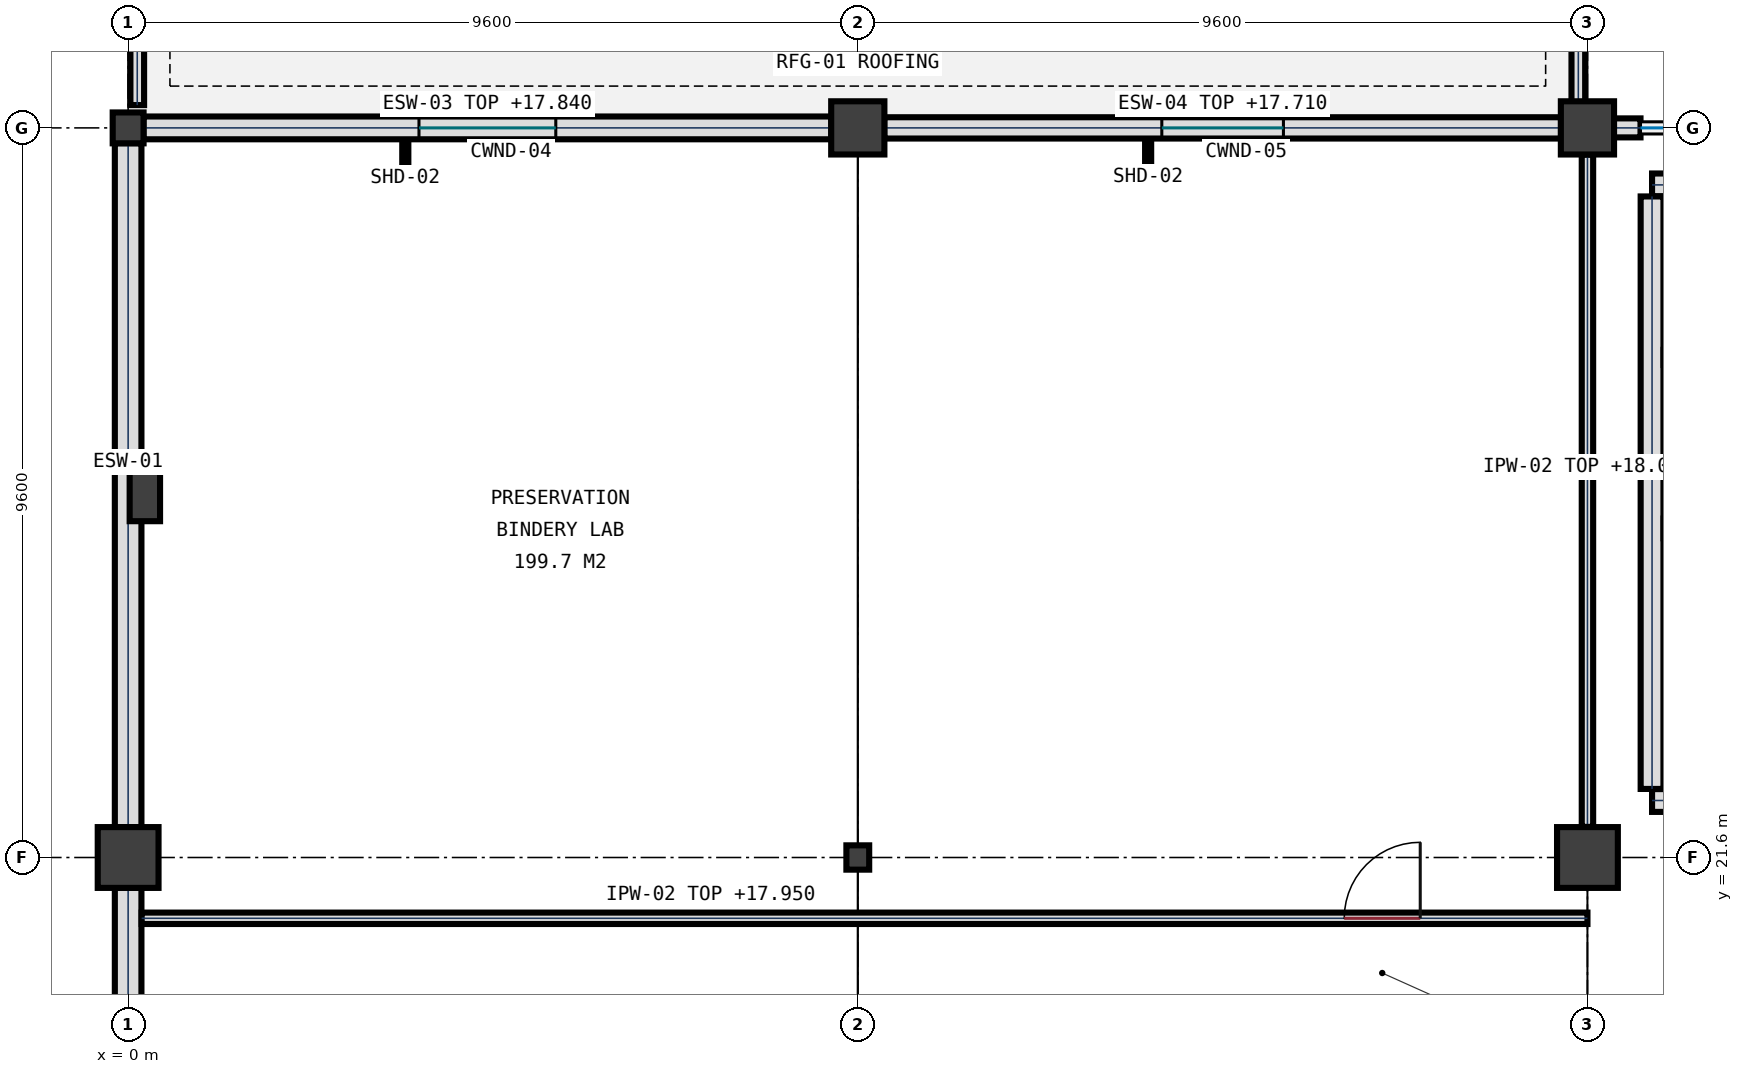
"""IFC4 building model, lengths in metres.
Left out: names, types, materials, properties, quantities, classifications, styles, units other than length and angle.
Written with IfcOpenShell. Run it as: python <this file> out.ifc"""

import sys

from ifc_helpers import new_model, si_unit, direction, frame, frame_2d, origin, origin_2d, place, context, subcontext, project, spatial, rectangle, circle, hollow_circle, i_section, extrude, element, fill, save


model = new_model("IFC4")
c1 = context("Model", 3, precision=1e-05, world=origin(), true_north=direction((0.0, 1.0)))
c2 = subcontext(c1, "Body", "Model", "MODEL_VIEW")
j1 = project(units=[si_unit("LENGTHUNIT", "METRE"), si_unit("PLANEANGLEUNIT", "RADIAN")], contexts=[c1])
p1 = place(None, origin())
s1 = spatial("IfcSite", under=j1, at=p1, CompositionType="ELEMENT")
p2 = place(p1, origin())
s2 = spatial("IfcBuilding", under=s1, at=p2, CompositionType="ELEMENT")
p3 = place(p2, frame((0.0, 0.0, 14.4)))
s3 = spatial("IfcBuildingStorey", under=s2, at=p3, CompositionType="ELEMENT", Elevation=14.4)
p4 = place(p3, frame((0.0, 21.6, 0.0), z_axis=(0.0, 0.0, 1.0), x_axis=(1.0, 0.0, 0.0)))
e1 = element("IfcColumn", 1, at=p4, inside=s3, PredefinedType="COLUMN", context=c2, shape_type="SweptSolid", body=[
    extrude(circle(Radius=0.4, at=origin_2d()), origin(), (0.0, 0.0, 1.0), 4.5),
])
p5 = place(p3, frame((0.0, 31.2, 0.0), z_axis=(0.0, 0.0, 1.0), x_axis=(1.0, 0.0, 0.0)))
e2 = element("IfcColumn", 2, at=p5, inside=s3, PredefinedType="COLUMN", context=c2, shape_type="SweptSolid", body=[
    extrude(hollow_circle(Radius=0.203, WallThickness=0.016, at=origin_2d()), origin(), (0.0, 0.0, 1.0), 4.5),
])
p6 = place(p3, frame((9.6, 21.6, 0.0), z_axis=(0.0, 0.0, 1.0), x_axis=(1.0, 0.0, 0.0)))
e3 = element("IfcColumn", 3, at=p6, inside=s3, PredefinedType="COLUMN", context=c2, shape_type="SweptSolid", body=[
    extrude(i_section(OverallWidth=0.3, OverallDepth=0.32, WebThickness=0.011, FlangeThickness=0.021, FilletRadius=0.027, at=origin_2d()), origin(), (0.0, 0.0, 1.0), 4.5),
])
p7 = place(p3, frame((9.6, 31.2, 0.0), z_axis=(0.0, 0.0, 1.0), x_axis=(1.0, 0.0, 0.0)))
e4 = element("IfcColumn", 4, at=p7, inside=s3, PredefinedType="COLUMN", context=c2, shape_type="SweptSolid", body=[
    extrude(circle(Radius=0.35, at=origin_2d()), origin(), (0.0, 0.0, 1.0), 4.5),
])
p8 = place(p3, frame((19.2, 21.6, 0.0), z_axis=(0.0, 0.0, 1.0), x_axis=(1.0, 0.0, 0.0)))
e5 = element("IfcColumn", 5, at=p8, inside=s3, PredefinedType="COLUMN", context=c2, shape_type="SweptSolid", body=[
    extrude(circle(Radius=0.4, at=origin_2d()), origin(), (0.0, 0.0, 1.0), 4.5),
])
p9 = place(p3, frame((19.2, 31.2, 0.0), z_axis=(0.0, 0.0, 1.0), x_axis=(1.0, 0.0, 0.0)))
e6 = element("IfcColumn", 6, at=p9, inside=s3, PredefinedType="COLUMN", context=c2, shape_type="SweptSolid", body=[
    extrude(circle(Radius=0.35, at=origin_2d()), origin(), (0.0, 0.0, 1.0), 4.5),
])
p10 = place(p3, frame((0.22, 26.4, 0.0), z_axis=(0.0, 0.0, 1.0), x_axis=(1.0, 0.0, 0.0)))
e7 = element("IfcColumn", 7, at=p10, inside=s3, PredefinedType="PILASTER", context=c2, shape_type="SweptSolid", body=[
    extrude(rectangle(XDim=0.4, YDim=0.75, at=origin_2d()), origin(), (0.0, 0.0, 1.0), 4.5),
])
p11 = place(p3, frame((0.0, 12.448, 0.0), z_axis=(0.0, 0.0, 1.0), x_axis=(0.0, 1.0, 0.0)))
e8 = element("IfcWall", 8, at=p11, inside=s3, PredefinedType="SOLIDWALL", context=c2, shape_type="SweptSolid", body=[
    extrude(rectangle(XDim=8.754, YDim=0.35, at=frame_2d((4.377, 0.0))), origin(), (0.0, 0.0, 1.0), 4.24),
])
p12 = place(p3, frame((0.0, 21.998, 0.0), z_axis=(0.0, 0.0, 1.0), x_axis=(0.0, 1.0, 0.0)))
e9 = element("IfcWall", 9, at=p12, inside=s3, PredefinedType="SOLIDWALL", context=c2, shape_type="SweptSolid", body=[
    extrude(rectangle(XDim=9.001, YDim=0.35, at=frame_2d((4.5, 0.0))), origin(), (0.0, 0.0, 1.0), 4.24),
])
p13 = place(p3, frame((0.201, 31.2, 0.0), z_axis=(0.0, 0.0, 1.0), x_axis=(1.0, 0.0, 0.0)))
e10 = element("IfcWall", 10, at=p13, inside=s3, PredefinedType="SOLIDWALL", context=c2, shape_type="SweptSolid", body=[
    extrude(rectangle(XDim=9.051, YDim=0.3, at=frame_2d((4.525, 0.0))), origin(), (0.0, 0.0, 1.0), 3.44),
])
p14 = place(p13, frame((3.625, 0.0, 0.95)))
e11 = element("IfcOpeningElement", 11, at=p14, cuts=e10, PredefinedType="OPENING", context=c2, shape_type="SweptSolid", body=[
    extrude(rectangle(XDim=1.8, YDim=1.55, at=frame_2d((0.9, 0.775))), frame((0.0, 0.16, 0.0), z_axis=(0.0, -1.0, 0.0), x_axis=(1.0, 0.0, 0.0)), (0.0, 0.0, 1.0), 0.32),
])
p15 = place(p3, frame((9.948, 31.2, 0.0), z_axis=(0.0, 0.0, 1.0), x_axis=(1.0, 0.0, 0.0)))
e12 = element("IfcWall", 12, at=p15, inside=s3, PredefinedType="SOLIDWALL", context=c2, shape_type="SweptSolid", body=[
    extrude(rectangle(XDim=8.904, YDim=0.28, at=frame_2d((4.452, 0.0))), origin(), (0.0, 0.0, 1.0), 3.31),
])
p16 = place(p15, frame((3.652, 0.0, 0.95)))
e13 = element("IfcOpeningElement", 13, at=p16, cuts=e12, PredefinedType="OPENING", context=c2, shape_type="SweptSolid", body=[
    extrude(rectangle(XDim=1.6, YDim=1.55, at=frame_2d((0.8, 0.775))), frame((0.0, 0.15, 0.0), z_axis=(0.0, -1.0, 0.0), x_axis=(1.0, 0.0, 0.0)), (0.0, 0.0, 1.0), 0.3),
])
p17 = place(p3, frame((19.548, 31.2, 0.0), z_axis=(0.0, 0.0, 1.0), x_axis=(1.0, 0.0, 0.0)))
e14 = element("IfcWall", 14, at=p17, inside=s3, PredefinedType="SOLIDWALL", context=c2, shape_type="SweptSolid", body=[
    extrude(rectangle(XDim=0.35, YDim=0.25, at=frame_2d((0.175, 0.0))), origin(), (0.0, 0.0, 1.0), 3.6),
])
for number, where, z_axis, x_axis in (
    (15, (0.12, 31.5, 0.0), (0.0, 0.0, 1.0), (0.0, 1.0, 0.0)),
    (16, (19.08, 31.5, 0.0), (0.0, 0.0, 1.0), (0.0, 1.0, 0.0)),
):
    element("IfcWall", number, at=place(p3, frame(where, z_axis=z_axis, x_axis=x_axis)), inside=s3, PredefinedType="PARAPET", context=c2, shape_type="SweptSolid", body=[
        extrude(rectangle(XDim=9.0, YDim=0.18, at=frame_2d((4.5, 0.0))), origin(), (0.0, 0.0, 1.0), 1.15),
    ])
for number, where, z_axis, x_axis in (
    (17, (29.55, 22.35, 0.0), (0.0, 0.0, 1.0), (-1.0, 0.0, 0.0)),
    (18, (20.05, 30.45, 0.0), (0.0, 0.0, 1.0), (1.0, 0.0, 0.0)),
):
    element("IfcWall", number, at=place(p3, frame(where, z_axis=z_axis, x_axis=x_axis)), inside=s3, PredefinedType="SHEAR", context=c2, shape_type="SweptSolid", body=[
        extrude(rectangle(XDim=9.5, YDim=0.3, at=frame_2d((4.75, 0.0))), origin(), (0.0, 0.0, 1.0), 4.5),
    ])
p18 = place(p3, frame((20.05, 22.502, 0.0), z_axis=(0.0, 0.0, 1.0), x_axis=(0.0, 1.0, 0.0)))
e19 = element("IfcWall", 19, at=p18, inside=s3, PredefinedType="SHEAR", context=c2, shape_type="SweptSolid", body=[
    extrude(rectangle(XDim=7.796, YDim=0.3, at=frame_2d((3.898, 0.0))), origin(), (0.0, 0.0, 1.0), 4.5),
])
p19 = place(p3, frame((0.178, 20.8, 0.0), z_axis=(0.0, 0.0, 1.0), x_axis=(1.0, 0.0, 0.0)))
e20 = element("IfcWall", 20, at=p19, inside=s3, PredefinedType="PARTITIONING", context=c2, shape_type="SweptSolid", body=[
    extrude(rectangle(XDim=19.022, YDim=0.15, at=frame_2d((9.511, 0.0))), origin(), (0.0, 0.0, 1.0), 3.55),
])
p20 = place(p19, frame((15.822, 0.0, 0.0)))
e21 = element("IfcOpeningElement", 21, at=p20, cuts=e20, PredefinedType="OPENING", context=c2, shape_type="SweptSolid", body=[
    extrude(rectangle(XDim=1.0, YDim=2.2, at=frame_2d((0.5, 1.1))), frame((0.0, 0.085, 0.0), z_axis=(0.0, -1.0, 0.0), x_axis=(1.0, 0.0, 0.0)), (0.0, 0.0, 1.0), 0.17),
])
p21 = place(p3, frame((19.2, 22.003, 0.0), z_axis=(0.0, 0.0, 1.0), x_axis=(0.0, 1.0, 0.0)))
e22 = element("IfcWall", 22, at=p21, inside=s3, PredefinedType="PARTITIONING", context=c2, shape_type="SweptSolid", body=[
    extrude(rectangle(XDim=8.844, YDim=0.15, at=frame_2d((4.422, 0.0))), origin(), (0.0, 0.0, 1.0), 3.6),
])
p22 = place(p14, origin())
e23 = element("IfcWindow", 23, at=p22, inside=s3, PartitioningType="SINGLE_PANEL", PredefinedType="WINDOW", context=c2, shape_type="SweptSolid", body=[
    extrude(rectangle(XDim=1.8, YDim=1.55, at=frame_2d((0.9, 0.775))), frame((0.0, 0.032, 0.0), z_axis=(0.0, -1.0, 0.0), x_axis=(1.0, 0.0, 0.0)), (0.0, 0.0, 1.0), 0.065),
])
fill(e11, e23)
p23 = place(p16, origin())
e24 = element("IfcWindow", 24, at=p23, inside=s3, PartitioningType="SINGLE_PANEL", PredefinedType="WINDOW", context=c2, shape_type="SweptSolid", body=[
    extrude(rectangle(XDim=1.6, YDim=1.55, at=frame_2d((0.8, 0.775))), frame((0.0, 0.032, 0.0), z_axis=(0.0, -1.0, 0.0), x_axis=(1.0, 0.0, 0.0)), (0.0, 0.0, 1.0), 0.065),
])
fill(e13, e24)
p24 = place(p20, origin())
e25 = element("IfcDoor", 25, at=p24, inside=s3, OperationType="SINGLE_SWING_RIGHT", PredefinedType="DOOR", context=c2, shape_type="SweptSolid", body=[
    extrude(rectangle(XDim=1.0, YDim=2.2, at=frame_2d((0.5, 1.1))), frame((0.0, 0.032, 0.0), z_axis=(0.0, -1.0, 0.0), x_axis=(1.0, 0.0, 0.0)), (0.0, 0.0, 1.0), 0.065),
])
fill(e21, e25)
save(model, sys.argv[1])
